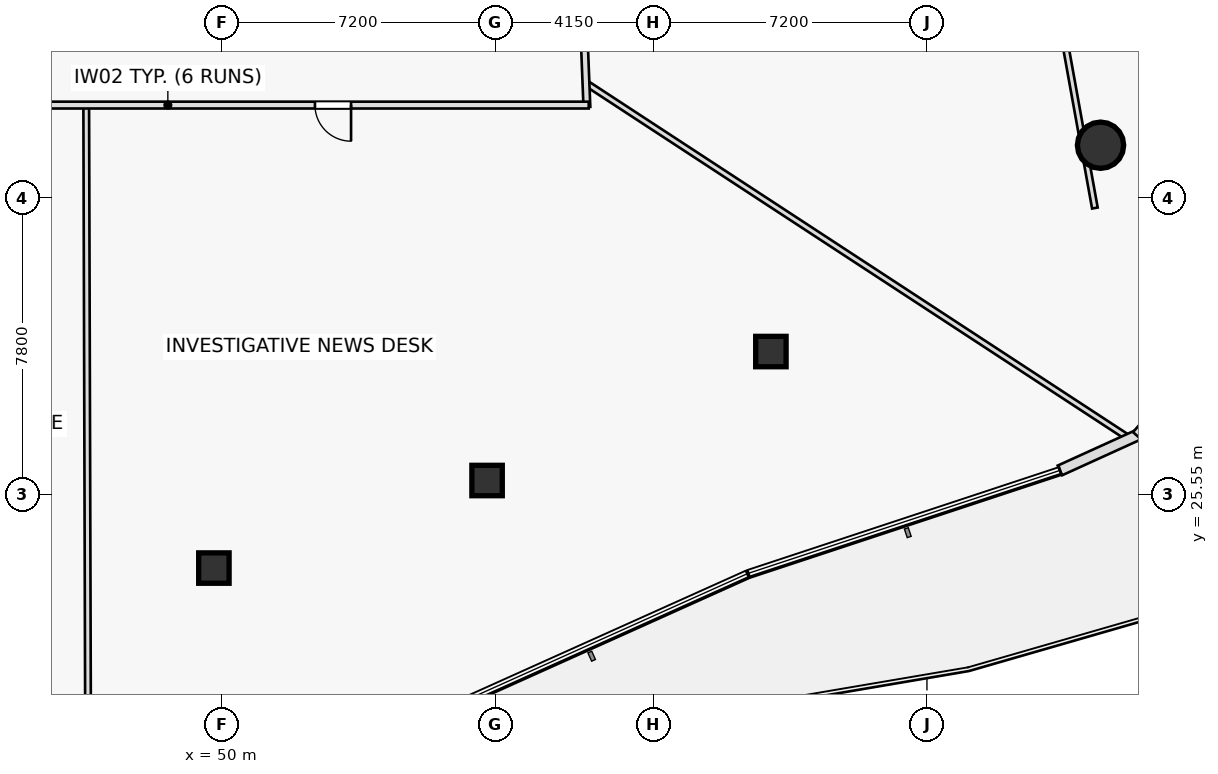
"""IFC4 building model, lengths in metres.
Left out: names, types, materials, properties, quantities, classifications, styles, units other than length and angle.
Written with IfcOpenShell. Run it as: python <this file> out.ifc"""

import sys

from ifc_helpers import new_model, si_unit, direction, frame, frame_2d, origin, origin_2d, place, context, subcontext, project, spatial, rectangle, hollow_rectangle, hollow_circle, extrude, element, fill, save


model = new_model("IFC4")
c1 = context("Model", 3, precision=1e-05, world=origin(), true_north=direction((0.0, 1.0)))
c2 = subcontext(c1, "Body", "Model", "MODEL_VIEW")
j1 = project(units=[si_unit("LENGTHUNIT", "METRE"), si_unit("PLANEANGLEUNIT", "RADIAN")], contexts=[c1])
p1 = place(None, origin())
s1 = spatial("IfcSite", under=j1, at=p1, CompositionType="ELEMENT")
p2 = place(p1, origin())
s2 = spatial("IfcBuilding", under=s1, at=p2, CompositionType="ELEMENT")
p3 = place(p2, frame((0.0, 0.0, 27.6)))
s3 = spatial("IfcBuildingStorey", under=s2, at=p3, CompositionType="ELEMENT", Elevation=27.6)
for number, where, z_axis, x_axis in (
    (1, (49.787, 23.618, 0.0), (0.0, 0.0, 1.0), (1.0, 0.0, 0.0)),
    (2, (56.975, 25.921, 0.0), (0.0, 0.0, 1.0), (1.0, 0.0, 0.0)),
    (3, (64.444, 29.315, 0.0), (0.0, 0.0, 1.0), (1.0, 0.0, 0.0)),
):
    element("IfcColumn", number, at=place(p3, frame(where, z_axis=z_axis, x_axis=x_axis)), inside=s3, PredefinedType="COLUMN", context=c2, shape_type="SweptSolid", body=[
        extrude(hollow_rectangle(XDim=0.8, YDim=0.8, WallThickness=0.045, at=origin_2d()), origin(), (0.0, 0.0, 1.0), 3.6),
    ])
p4 = place(p3, frame((73.118, 34.744, 0.0), z_axis=(0.0, 0.0, 1.0), x_axis=(1.0, 0.0, 0.0)))
e4 = element("IfcColumn", 4, at=p4, inside=s3, PredefinedType="COLUMN", context=c2, shape_type="SweptSolid", body=[
    extrude(hollow_circle(Radius=0.61, WallThickness=0.05, at=origin_2d()), origin(), (0.0, 0.0, 1.0), 3.6),
])
p5 = place(p3, frame((72.969, 33.091, 0.0), z_axis=(0.0, 0.0, 1.0), x_axis=(-0.177742578179, 0.984077017261, 0.0)))
e5 = element("IfcWall", 5, at=p5, inside=s3, PredefinedType="PARTITIONING", context=c2, shape_type="SweptSolid", body=[
    extrude(rectangle(XDim=13.179, YDim=0.15, at=frame_2d((6.59, 0.0))), origin(), (0.0, 0.0, 1.0), 2.925),
])
p6 = place(p3, frame((46.427, 35.8, 0.0), z_axis=(0.0, 0.0, 1.0), x_axis=(0.002955422619, -0.999995632729, 0.0)))
e6 = element("IfcWall", 6, at=p6, inside=s3, PredefinedType="PARTITIONING", context=c2, shape_type="SweptSolid", body=[
    extrude(rectangle(XDim=16.769, YDim=0.15, at=frame_2d((8.385, 0.0))), origin(), (0.0, 0.0, 1.0), 2.925),
])
p7 = place(p3, frame((59.577, 36.381, 0.0), z_axis=(0.0, 0.0, 1.0), x_axis=(0.83686376377, -0.547411217358, 0.0)))
e7 = element("IfcWall", 7, at=p7, inside=s3, PredefinedType="PARTITIONING", context=c2, shape_type="SweptSolid", body=[
    extrude(rectangle(XDim=17.109, YDim=0.15, at=frame_2d((8.554, 0.0))), origin(), (0.0, 0.0, 1.0), 2.975),
])
p8 = place(p3, frame((59.392, 41.1, 0.0), z_axis=(0.0, 0.0, 1.0), x_axis=(0.03921413315, -0.999230830069, 0.0)))
e8 = element("IfcWall", 8, at=p8, inside=s3, PredefinedType="PARTITIONING", context=c2, shape_type="SweptSolid", body=[
    extrude(rectangle(XDim=5.354, YDim=0.18, at=frame_2d((2.677, 0.0))), origin(), (0.0, 0.0, 1.0), 2.925),
])
p9 = place(p8, frame((2.037, 0.0, 0.0)))
e9 = element("IfcOpeningElement", 9, at=p9, cuts=e8, PredefinedType="OPENING", context=c2, shape_type="SweptSolid", body=[
    extrude(rectangle(XDim=0.95, YDim=2.05, at=frame_2d((0.475, 1.025))), frame((0.0, 0.1, 0.0), z_axis=(0.0, -1.0, 0.0), x_axis=(1.0, 0.0, 0.0)), (0.0, 0.0, 1.0), 0.2),
])
p10 = place(p3, frame((59.65, 35.8, 0.0), z_axis=(0.0, 0.0, 1.0), x_axis=(-1.0, 0.0, 0.0)))
e10 = element("IfcWall", 10, at=p10, inside=s3, PredefinedType="PARTITIONING", context=c2, shape_type="SweptSolid", body=[
    extrude(rectangle(XDim=22.15, YDim=0.18, at=frame_2d((11.075, 0.0))), origin(), (0.0, 0.0, 1.0), 2.925),
])
p11 = place(p10, frame((6.254, 0.0, 0.0)))
e11 = element("IfcOpeningElement", 11, at=p11, cuts=e10, PredefinedType="OPENING", context=c2, shape_type="SweptSolid", body=[
    extrude(rectangle(XDim=0.95, YDim=2.05, at=frame_2d((0.475, 1.025))), frame((0.0, 0.1, 0.0), z_axis=(0.0, -1.0, 0.0), x_axis=(1.0, 0.0, 0.0)), (0.0, 0.0, 1.0), 0.2),
])
p12 = place(p10, frame((15.103, 0.0, 0.0)))
e12 = element("IfcOpeningElement", 12, at=p12, cuts=e10, PredefinedType="OPENING", context=c2, shape_type="SweptSolid", body=[
    extrude(rectangle(XDim=0.95, YDim=2.05, at=frame_2d((0.475, 1.025))), frame((0.0, 0.1, 0.0), z_axis=(0.0, -1.0, 0.0), x_axis=(1.0, 0.0, 0.0)), (0.0, 0.0, 1.0), 0.2),
])
p13 = place(p3, frame((72.049, 26.187, 0.0), z_axis=(0.0, 0.0, 1.0), x_axis=(0.910281161634, 0.413990587786, 0.0)))
e13 = element("IfcWall", 13, at=p13, inside=s3, PredefinedType="STANDARD", context=c2, shape_type="SweptSolid", body=[
    extrude(rectangle(XDim=2.255, YDim=0.28, at=frame_2d((1.127, 0.0))), origin(), (0.0, 0.0, 1.0), 3.6),
])
p14 = place(p3, frame((74.077, 27.103, 0.0), z_axis=(0.0, 0.0, 1.0), x_axis=(0.659328805879, 0.751854723825, 0.0)))
e14 = element("IfcWall", 14, at=p14, inside=s3, PredefinedType="STANDARD", context=c2, shape_type="SweptSolid", body=[
    extrude(rectangle(XDim=2.243, YDim=0.28, at=frame_2d((1.122, 0.0))), origin(), (0.0, 0.0, 1.0), 3.6),
])
p15 = place(p3, frame((75.909, 33.096, 0.0), z_axis=(0.0, 0.0, 1.0), x_axis=(-0.233851528727, 0.972272319112, 0.0)))
e15 = element("IfcWall", 15, at=p15, inside=s3, PredefinedType="STANDARD", context=c2, shape_type="SweptSolid", body=[
    extrude(rectangle(XDim=8.682, YDim=0.28, at=frame_2d((4.341, 0.0))), origin(), (0.0, 0.0, 1.0), 3.6),
])
p16 = place(p11, origin())
e16 = element("IfcDoor", 16, at=p16, inside=s3, OperationType="SINGLE_SWING_LEFT", PredefinedType="DOOR", context=c2, shape_type="SweptSolid", body=[
    extrude(rectangle(XDim=0.95, YDim=2.05, at=frame_2d((0.475, 1.025))), frame((0.0, 0.025, 0.0), z_axis=(0.0, -1.0, 0.0), x_axis=(1.0, 0.0, 0.0)), (0.0, 0.0, 1.0), 0.05),
])
fill(e11, e16)
save(model, sys.argv[1])
